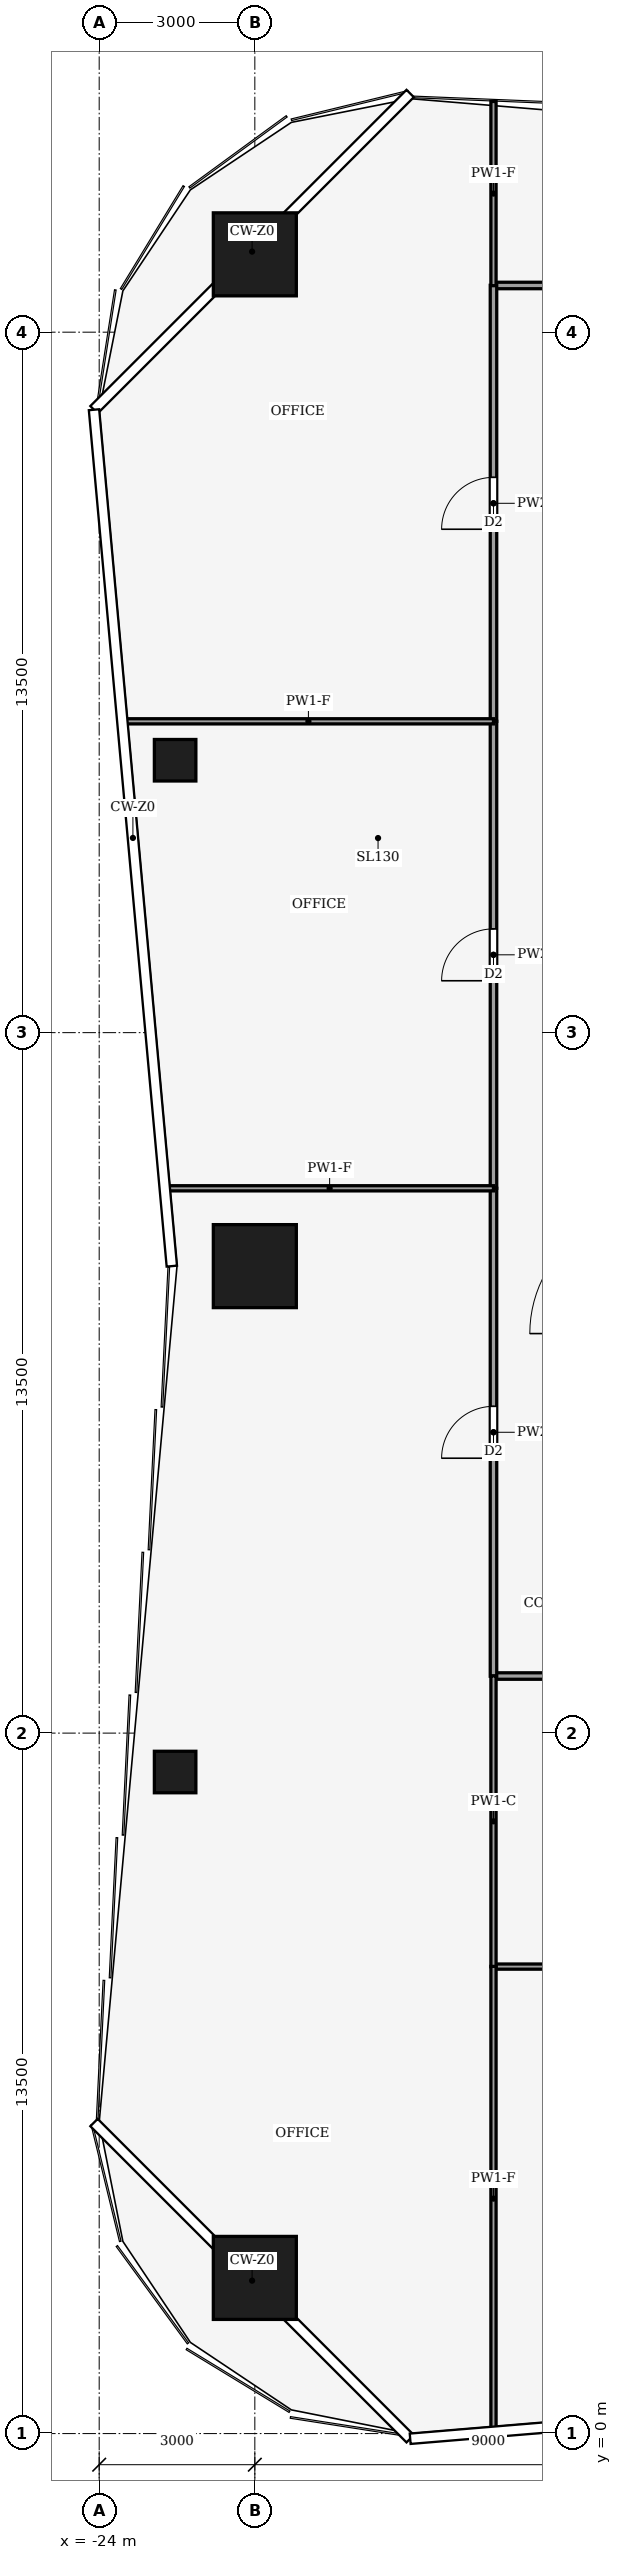
"""IFC4 building model, lengths in metres.
Left out: names, types, materials, properties, quantities, classifications, styles, units other than length and angle.
Written with IfcOpenShell. Run it as: python <this file> out.ifc"""

import sys

from ifc_helpers import new_model, si_unit, direction, frame, frame_2d, origin, origin_2d, place, context, subcontext, project, spatial, rectangle, hollow_rectangle, extrude, element, fill, save


model = new_model("IFC4")
c1 = context("Model", 3, precision=1e-05, world=origin(), true_north=direction((0.0, 1.0)))
c2 = subcontext(c1, "Body", "Model", "MODEL_VIEW")
j1 = project(units=[si_unit("LENGTHUNIT", "METRE"), si_unit("PLANEANGLEUNIT", "RADIAN")], contexts=[c1])
p1 = place(None, origin())
s1 = spatial("IfcSite", under=j1, at=p1, CompositionType="ELEMENT")
p2 = place(p1, origin())
s2 = spatial("IfcBuilding", under=s1, at=p2, CompositionType="ELEMENT")
p3 = place(p2, frame((0.0, 0.0, 42.0)))
s3 = spatial("IfcBuildingStorey", under=s2, at=p3, CompositionType="ELEMENT", Elevation=42.0)
for number, where, z_axis, x_axis in (
    (1, (-21.0, 42.0, 0.0), (0.0, 0.0, 1.0), (1.0, 0.0, 0.0)),
    (2, (-21.0, 3.0, 0.0), (0.0, 0.0, 1.0), (1.0, 0.0, 0.0)),
    (3, (-21.0, 22.5, 0.0), (0.0, 0.0, 1.0), (1.0, 0.0, 0.0)),
):
    element("IfcColumn", number, at=place(p3, frame(where, z_axis=z_axis, x_axis=x_axis)), inside=s3, PredefinedType="COLUMN", context=c2, shape_type="SweptSolid", body=[
        extrude(hollow_rectangle(XDim=1.6, YDim=1.6, WallThickness=0.09, at=origin_2d()), origin(), (0.0, 0.0, 1.0), 4.0),
    ])
for number, where, z_axis, x_axis in (
    (4, (-22.536, 12.75, 0.0), (0.0, 0.0, 1.0), (1.0, 0.0, 0.0)),
    (5, (-22.536, 32.25, 0.0), (0.0, 0.0, 1.0), (1.0, 0.0, 0.0)),
):
    element("IfcColumn", number, at=place(p3, frame(where, z_axis=z_axis, x_axis=x_axis)), inside=s3, PredefinedType="COLUMN", context=c2, shape_type="SweptSolid", body=[
        extrude(hollow_rectangle(XDim=0.8, YDim=0.8, WallThickness=0.04, at=origin_2d()), origin(), (0.0, 0.0, 1.0), 4.0),
    ])
p4 = place(p3, frame((-9.0, 14.6, 0.0), z_axis=(0.0, 0.0, 1.0), x_axis=(-1.0, 0.0, 0.0)))
e6 = element("IfcWall", 6, at=p4, inside=s3, PredefinedType="PARTITIONING", context=c2, shape_type="SweptSolid", body=[
    extrude(rectangle(XDim=7.4, YDim=0.125, at=frame_2d((3.7, 0.0))), origin(), (0.0, 0.0, 1.0), 3.29),
])
p5 = place(p4, frame((3.2, 0.0, 0.0)))
e7 = element("IfcOpeningElement", 7, at=p5, cuts=e6, PredefinedType="OPENING", context=c2, shape_type="SweptSolid", body=[
    extrude(rectangle(XDim=1.0, YDim=2.1, at=frame_2d((0.5, 1.05))), frame((0.0, 0.073, 0.0), z_axis=(0.0, -1.0, 0.0), x_axis=(1.0, 0.0, 0.0)), (0.0, 0.0, 1.0), 0.145),
])
p6 = place(p3, frame((-16.4, 41.4, 0.0), z_axis=(0.0, 0.0, 1.0), x_axis=(1.0, 0.0, 0.0)))
e8 = element("IfcWall", 8, at=p6, inside=s3, PredefinedType="PARTITIONING", context=c2, shape_type="SweptSolid", body=[
    extrude(rectangle(XDim=10.4, YDim=0.125, at=frame_2d((5.2, 0.0))), origin(), (0.0, 0.0, 1.0), 3.54),
])
p7 = place(p6, frame((7.5, 0.0, 0.0)))
e9 = element("IfcOpeningElement", 9, at=p7, cuts=e8, PredefinedType="OPENING", context=c2, shape_type="SweptSolid", body=[
    extrude(rectangle(XDim=1.0, YDim=2.1, at=frame_2d((0.5, 1.05))), frame((0.0, 0.073, 0.0), z_axis=(0.0, -1.0, 0.0), x_axis=(1.0, 0.0, 0.0)), (0.0, 0.0, 1.0), 0.145),
])
p8 = place(p3, frame((-16.4, 14.596, 0.0), z_axis=(0.0, 0.0, 1.0), x_axis=(0.0, 1.0, 0.0)))
e10 = element("IfcWall", 10, at=p8, inside=s3, PredefinedType="PARTITIONING", context=c2, shape_type="SweptSolid", body=[
    extrude(rectangle(XDim=9.404, YDim=0.125, at=frame_2d((4.702, 0.0))), origin(), (0.0, 0.0, 1.0), 3.14),
])
p9 = place(p8, frame((4.202, 0.0, 0.0)))
e11 = element("IfcOpeningElement", 11, at=p9, cuts=e10, PredefinedType="OPENING", context=c2, shape_type="SweptSolid", body=[
    extrude(rectangle(XDim=1.0, YDim=2.1, at=frame_2d((0.5, 1.05))), frame((0.0, 0.073, 0.0), z_axis=(0.0, -1.0, 0.0), x_axis=(1.0, 0.0, 0.0)), (0.0, 0.0, 1.0), 0.145),
])
p10 = place(p3, frame((-16.4, 24.0, 0.0), z_axis=(0.0, 0.0, 1.0), x_axis=(0.0, 1.0, 0.0)))
e12 = element("IfcWall", 12, at=p10, inside=s3, PredefinedType="PARTITIONING", context=c2, shape_type="SweptSolid", body=[
    extrude(rectangle(XDim=9.0, YDim=0.125, at=frame_2d((4.5, 0.0))), origin(), (0.0, 0.0, 1.0), 3.48),
])
p11 = place(p10, frame((4.0, 0.0, 0.0)))
e13 = element("IfcOpeningElement", 13, at=p11, cuts=e12, PredefinedType="OPENING", context=c2, shape_type="SweptSolid", body=[
    extrude(rectangle(XDim=1.0, YDim=2.1, at=frame_2d((0.5, 1.05))), frame((0.0, 0.073, 0.0), z_axis=(0.0, -1.0, 0.0), x_axis=(1.0, 0.0, 0.0)), (0.0, 0.0, 1.0), 0.145),
])
p12 = place(p3, frame((-16.4, 33.0, 0.0), z_axis=(0.0, 0.0, 1.0), x_axis=(0.0, 1.0, 0.0)))
e14 = element("IfcWall", 14, at=p12, inside=s3, PredefinedType="PARTITIONING", context=c2, shape_type="SweptSolid", body=[
    extrude(rectangle(XDim=8.404, YDim=0.125, at=frame_2d((4.202, 0.0))), origin(), (0.0, 0.0, 1.0), 3.14),
])
p13 = place(p12, frame((3.702, 0.0, 0.0)))
e15 = element("IfcOpeningElement", 15, at=p13, cuts=e14, PredefinedType="OPENING", context=c2, shape_type="SweptSolid", body=[
    extrude(rectangle(XDim=1.0, YDim=2.1, at=frame_2d((0.5, 1.05))), frame((0.0, 0.073, 0.0), z_axis=(0.0, -1.0, 0.0), x_axis=(1.0, 0.0, 0.0)), (0.0, 0.0, 1.0), 0.145),
])
p14 = place(p3, frame((-8.996, 9.0, 0.0), z_axis=(0.0, 0.0, 1.0), x_axis=(-1.0, 0.0, 0.0)))
e16 = element("IfcWall", 16, at=p14, inside=s3, PredefinedType="PARTITIONING", context=c2, shape_type="SweptSolid", body=[
    extrude(rectangle(XDim=7.404, YDim=0.1, at=frame_2d((3.702, 0.0))), origin(), (0.0, 0.0, 1.0), 3.29),
])
p15 = place(p14, frame((3.202, 0.0, 0.0)))
e17 = element("IfcOpeningElement", 17, at=p15, cuts=e16, PredefinedType="OPENING", context=c2, shape_type="SweptSolid", body=[
    extrude(rectangle(XDim=1.0, YDim=2.1, at=frame_2d((0.5, 1.05))), frame((0.0, 0.06, 0.0), z_axis=(0.0, -1.0, 0.0), x_axis=(1.0, 0.0, 0.0)), (0.0, 0.0, 1.0), 0.12),
])
p16 = place(p3, frame((-16.4, 14.604, 0.0), z_axis=(0.0, 0.0, 1.0), x_axis=(0.0, -1.0, 0.0)))
e18 = element("IfcWall", 18, at=p16, inside=s3, PredefinedType="PARTITIONING", context=c2, shape_type="SweptSolid", body=[
    extrude(rectangle(XDim=5.608, YDim=0.1, at=frame_2d((2.804, 0.0))), origin(), (0.0, 0.0, 1.0), 3.87),
])
p17 = place(p3, frame((-16.4, 9.004, 0.0), z_axis=(0.0, 0.0, 1.0), x_axis=(0.0, -1.0, 0.0)))
e19 = element("IfcWall", 19, at=p17, inside=s3, PredefinedType="PARTITIONING", context=c2, shape_type="SweptSolid", body=[
    extrude(rectangle(XDim=8.951, YDim=0.1, at=frame_2d((4.475, 0.0))), origin(), (0.0, 0.0, 1.0), 3.04),
])
p18 = place(p3, frame((-16.4, 44.947, 0.0), z_axis=(0.0, 0.0, 1.0), x_axis=(0.0, -1.0, 0.0)))
e20 = element("IfcWall", 20, at=p18, inside=s3, PredefinedType="PARTITIONING", context=c2, shape_type="SweptSolid", body=[
    extrude(rectangle(XDim=3.551, YDim=0.1, at=frame_2d((1.775, 0.0))), origin(), (0.0, 0.0, 1.0), 3.04),
])
p19 = place(p3, frame((-16.4, 24.0, 0.0), z_axis=(0.0, 0.0, 1.0), x_axis=(-1.0, 0.0, 0.0)))
e21 = element("IfcWall", 21, at=p19, inside=s3, PredefinedType="PARTITIONING", context=c2, shape_type="SweptSolid", body=[
    extrude(rectangle(XDim=6.316, YDim=0.1, at=frame_2d((3.158, 0.0))), origin(), (0.0, 0.0, 1.0), 3.04),
])
p20 = place(p3, frame((-16.4, 33.0, 0.0), z_axis=(0.0, 0.0, 1.0), x_axis=(-1.0, 0.0, 0.0)))
e22 = element("IfcWall", 22, at=p20, inside=s3, PredefinedType="PARTITIONING", context=c2, shape_type="SweptSolid", body=[
    extrude(rectangle(XDim=7.135, YDim=0.1, at=frame_2d((3.567, 0.0))), origin(), (0.0, 0.0, 1.0), 3.04),
])
p21 = place(p9, origin())
e23 = element("IfcDoor", 23, at=p21, inside=s3, OperationType="SINGLE_SWING_LEFT", PredefinedType="DOOR", context=c2, shape_type="SweptSolid", body=[
    extrude(rectangle(XDim=1.0, YDim=2.1, at=frame_2d((0.5, 1.05))), frame((0.0, 0.025, 0.0), z_axis=(0.0, -1.0, 0.0), x_axis=(1.0, 0.0, 0.0)), (0.0, 0.0, 1.0), 0.05),
])
fill(e11, e23)
p22 = place(p11, origin())
e24 = element("IfcDoor", 24, at=p22, inside=s3, OperationType="SINGLE_SWING_RIGHT", PredefinedType="DOOR", context=c2, shape_type="SweptSolid", body=[
    extrude(rectangle(XDim=1.0, YDim=2.1, at=frame_2d((0.5, 1.05))), frame((0.0, 0.025, 0.0), z_axis=(0.0, -1.0, 0.0), x_axis=(1.0, 0.0, 0.0)), (0.0, 0.0, 1.0), 0.05),
])
fill(e13, e24)
p23 = place(p13, origin())
e25 = element("IfcDoor", 25, at=p23, inside=s3, OperationType="SINGLE_SWING_LEFT", PredefinedType="DOOR", context=c2, shape_type="SweptSolid", body=[
    extrude(rectangle(XDim=1.0, YDim=2.1, at=frame_2d((0.5, 1.05))), frame((0.0, 0.025, 0.0), z_axis=(0.0, -1.0, 0.0), x_axis=(1.0, 0.0, 0.0)), (0.0, 0.0, 1.0), 0.05),
])
fill(e15, e25)
save(model, sys.argv[1])
